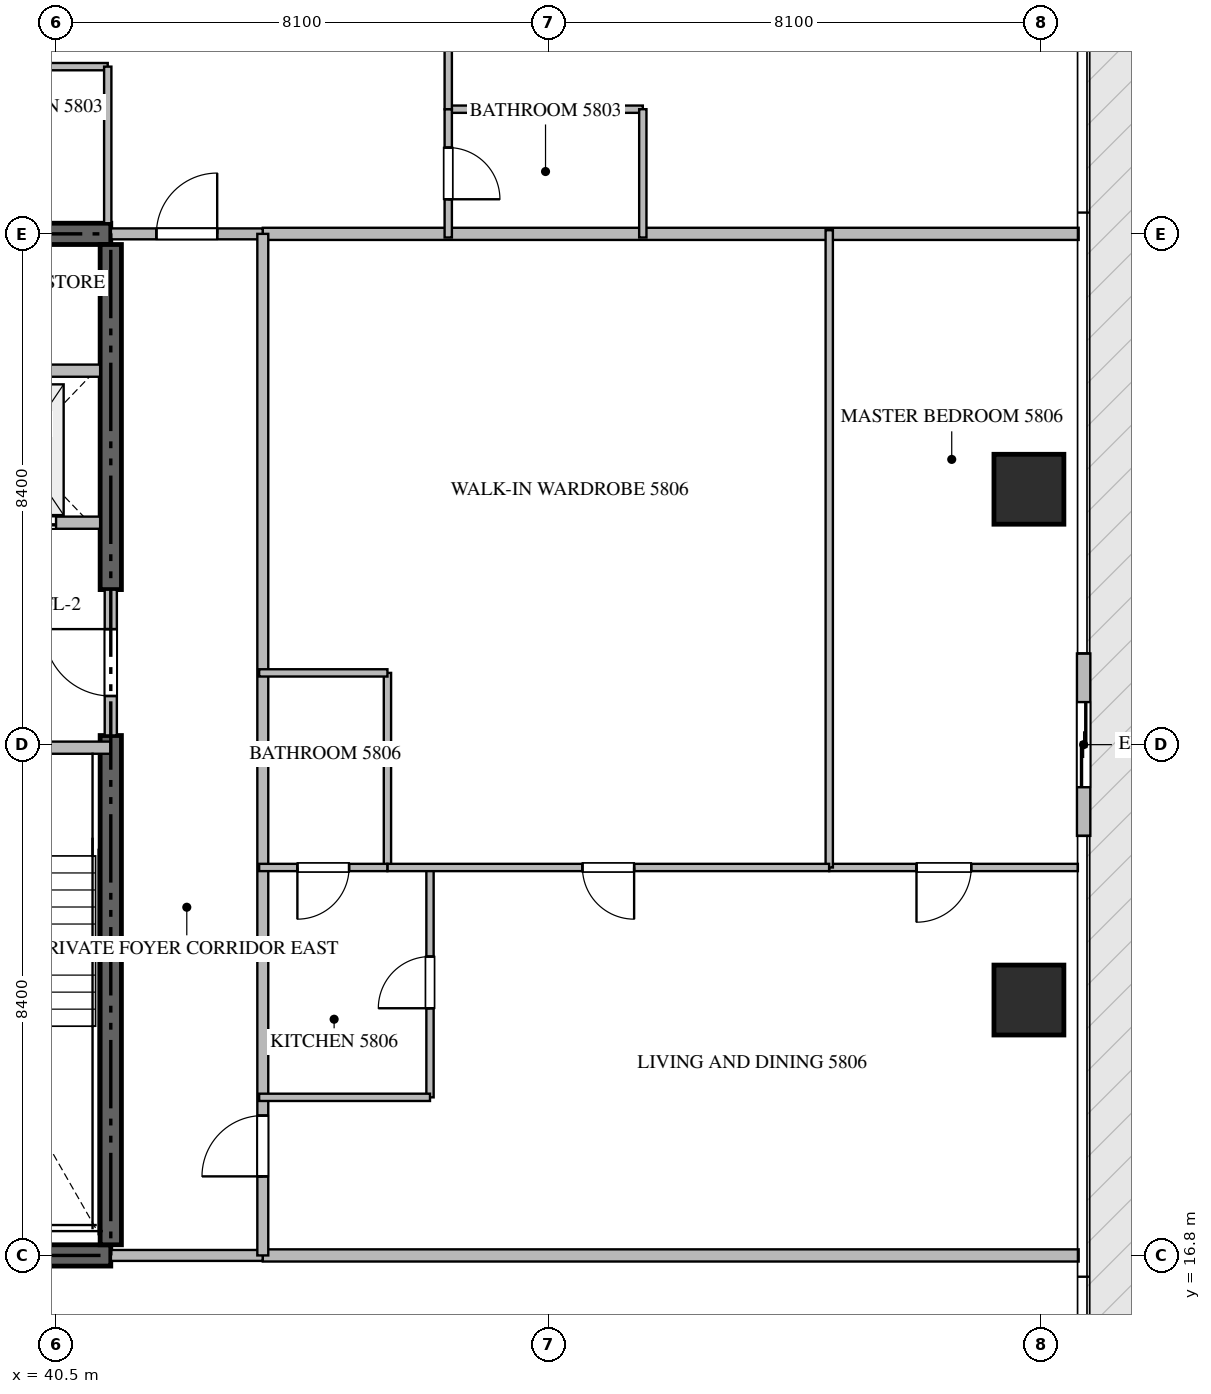
"""IFC4 building model, lengths in metres.
Left out: names, types, materials, properties, quantities, classifications, styles, units other than length and angle.
Written with IfcOpenShell. Run it as: python <this file> out.ifc"""

import sys

from ifc_helpers import new_model, si_unit, direction, frame, frame_2d, origin, origin_2d, place, context, subcontext, project, spatial, rectangle, extrude, source, transform, mapped, element, fill, save


model = new_model("IFC4")
c1 = context("Model", 3, precision=1e-05, world=origin(), true_north=direction((0.0, 1.0)))
c2 = subcontext(c1, "Body", "Model", "MODEL_VIEW")
j1 = project(units=[si_unit("LENGTHUNIT", "METRE"), si_unit("PLANEANGLEUNIT", "RADIAN")], contexts=[c1])
p1 = place(None, origin())
s1 = spatial("IfcSite", under=j1, at=p1, CompositionType="ELEMENT")
p2 = place(p1, origin())
s2 = spatial("IfcBuilding", under=s1, at=p2, CompositionType="ELEMENT")
p3 = place(p2, frame((0.0, 0.0, 233.55)))
s3 = spatial("IfcBuildingStorey", under=s2, at=p3, CompositionType="ELEMENT", Elevation=233.55)
for number, where, z_axis, x_axis in (
    (1, (23.4, 16.8, -0.26), (0.0, 0.0, 1.0), (1.0, 0.0, 0.0)),
    (2, (41.4, 33.6, -0.26), (0.0, 0.0, 1.0), (-1.0, 0.0, 0.0)),
):
    element("IfcWall", number, at=place(p3, frame(where, z_axis=z_axis, x_axis=x_axis)), inside=s3, PredefinedType="SHEAR", context=c2, shape_type="SweptSolid", body=[
        extrude(rectangle(XDim=18.0, YDim=0.35, at=frame_2d((9.0, 0.0))), origin(), (0.0, 0.0, 1.0), 3.848),
    ])
p4 = place(p3, frame((41.4, 16.975, -0.26), z_axis=(0.0, 0.0, 1.0), x_axis=(0.0, 1.0, 0.0)))
e3 = element("IfcWall", 3, at=p4, inside=s3, PredefinedType="SHEAR", context=c2, shape_type="SweptSolid", body=[
    extrude(rectangle(XDim=8.375, YDim=0.35, at=frame_2d((4.188, 0.0))), origin(), (0.0, 0.0, 1.0), 3.848),
])
p5 = place(p3, frame((41.4, 27.75, -0.26), z_axis=(0.0, 0.0, 1.0), x_axis=(0.0, 1.0, 0.0)))
e4 = element("IfcWall", 4, at=p5, inside=s3, PredefinedType="SHEAR", context=c2, shape_type="SweptSolid", body=[
    extrude(rectangle(XDim=5.675, YDim=0.35, at=frame_2d((2.837, 0.0))), origin(), (0.0, 0.0, 1.0), 3.848),
])
m1 = source(origin(), c2, "Body", "SweptSolid", [
    extrude(rectangle(XDim=1.15, YDim=1.15, at=origin_2d()), origin(), (0.0, 0.0, 1.0), 3.85),
])
for number, where, z_axis, x_axis in (
    (5, (56.5, 21.0, -0.26), (0.0, 0.0, 1.0), (1.0, 0.0, 0.0)),
    (6, (56.5, 29.4, -0.26), (0.0, 0.0, 1.0), (1.0, 0.0, 0.0)),
):
    element("IfcColumn", number, at=place(p3, frame(where, z_axis=z_axis, x_axis=x_axis)), inside=s3, PredefinedType="COLUMN", context=c2, shape_type="MappedRepresentation", body=[
        mapped(m1, transform((0.0, 0.0, 0.0), scale=1.0)),
    ])
p6 = place(p3, frame((57.4, 23.7, 0.0), z_axis=(0.0, 0.0, 1.0), x_axis=(0.0, 1.0, 0.0)))
e7 = element("IfcWall", 7, at=p6, inside=s3, PredefinedType="ELEMENTEDWALL", context=c2, shape_type="SweptSolid", body=[
    extrude(rectangle(XDim=3.0, YDim=0.22, at=frame_2d((1.5, 0.0))), origin(), (0.0, 0.0, 1.0), 3.575),
])
p7 = place(p6, frame((0.8, 0.0, 0.0)))
e8 = element("IfcOpeningElement", 8, at=p7, cuts=e7, PredefinedType="OPENING", context=c2, shape_type="SweptSolid", body=[
    extrude(rectangle(XDim=1.4, YDim=2.25, at=frame_2d((0.7, 1.125))), frame((0.0, 0.12, 0.0), z_axis=(0.0, -1.0, 0.0), x_axis=(1.0, 0.0, 0.0)), (0.0, 0.0, 1.0), 0.24),
])
p8 = place(p3, frame((36.95, 25.15, 0.0), z_axis=(0.0, 0.0, 1.0), x_axis=(1.0, 0.0, 0.0)))
e9 = element("IfcWall", 9, at=p8, inside=s3, PredefinedType="STANDARD", context=c2, shape_type="SweptSolid", body=[
    extrude(rectangle(XDim=4.45, YDim=0.2, at=frame_2d((2.225, 0.0))), origin(), (0.0, 0.0, 1.0), 3.59),
])
p9 = place(p8, frame((1.65, 0.0, 0.0)))
e10 = element("IfcOpeningElement", 10, at=p9, cuts=e9, PredefinedType="OPENING", context=c2, shape_type="SweptSolid", body=[
    extrude(rectangle(XDim=1.1, YDim=2.15, at=frame_2d((0.55, 1.075))), frame((0.0, 0.11, 0.0), z_axis=(0.0, -1.0, 0.0), x_axis=(1.0, 0.0, 0.0)), (0.0, 0.0, 1.0), 0.22),
])
p10 = place(p3, frame((38.75, 28.85, 0.0), z_axis=(0.0, 0.0, 1.0), x_axis=(1.0, 0.0, 0.0)))
e11 = element("IfcWall", 11, at=p10, inside=s3, PredefinedType="STANDARD", context=c2, shape_type="SweptSolid", body=[
    extrude(rectangle(XDim=2.475, YDim=0.2, at=frame_2d((1.238, 0.0))), origin(), (0.0, 0.0, 1.0), 3.59),
])
p11 = place(p10, frame((0.55, 0.0, 0.0)))
e12 = element("IfcOpeningElement", 12, at=p11, cuts=e11, PredefinedType="OPENING", context=c2, shape_type="SweptSolid", body=[
    extrude(rectangle(XDim=1.2, YDim=2.2, at=frame_2d((0.6, 1.1))), frame((0.0, 0.11, 0.0), z_axis=(0.0, -1.0, 0.0), x_axis=(1.0, 0.0, 0.0)), (0.0, 0.0, 1.0), 0.22),
])
p12 = place(p3, frame((38.75, 31.35, 0.0), z_axis=(0.0, 0.0, 1.0), x_axis=(1.0, 0.0, 0.0)))
e13 = element("IfcWall", 13, at=p12, inside=s3, PredefinedType="STANDARD", context=c2, shape_type="SweptSolid", body=[
    extrude(rectangle(XDim=2.475, YDim=0.2, at=frame_2d((1.238, 0.0))), origin(), (0.0, 0.0, 1.0), 3.59),
])
p13 = place(p3, frame((41.4, 25.352, 0.0), z_axis=(0.0, 0.0, 1.0), x_axis=(0.0, 1.0, 0.0)))
e14 = element("IfcWall", 14, at=p13, inside=s3, PredefinedType="STANDARD", context=c2, shape_type="SweptSolid", body=[
    extrude(rectangle(XDim=2.396, YDim=0.2, at=frame_2d((1.198, 0.0))), origin(), (0.0, 0.0, 1.0), 3.59),
])
p14 = place(p13, frame((0.648, 0.0, 0.0)))
e15 = element("IfcOpeningElement", 15, at=p14, cuts=e14, PredefinedType="OPENING", context=c2, shape_type="SweptSolid", body=[
    extrude(rectangle(XDim=1.1, YDim=2.15, at=frame_2d((0.55, 1.075))), frame((0.0, 0.11, 0.0), z_axis=(0.0, -1.0, 0.0), x_axis=(1.0, 0.0, 0.0)), (0.0, 0.0, 1.0), 0.22),
])
for number, where, z_axis, x_axis in (
    (16, (43.9, 16.8, 0.0), (0.0, 0.0, 1.0), (1.0, 0.0, 0.0)),
    (17, (43.9, 33.6, 0.0), (0.0, 0.0, 1.0), (1.0, 0.0, 0.0)),
):
    element("IfcWall", number, at=place(p3, frame(where, z_axis=z_axis, x_axis=x_axis)), inside=s3, PredefinedType="PARTITIONING", context=c2, shape_type="SweptSolid", body=[
        extrude(rectangle(XDim=13.418, YDim=0.2, at=frame_2d((6.709, 0.0))), origin(), (0.0, 0.0, 1.0), 3.59),
    ])
p15 = place(p3, frame((41.402, 16.8, 0.0), z_axis=(0.0, 0.0, 1.0), x_axis=(1.0, 0.0, 0.0)))
e18 = element("IfcWall", 18, at=p15, inside=s3, PredefinedType="PARTITIONING", context=c2, shape_type="SweptSolid", body=[
    extrude(rectangle(XDim=2.496, YDim=0.18, at=frame_2d((1.248, 0.0))), origin(), (0.0, 0.0, 1.0), 3.59),
])
p16 = place(p3, frame((41.402, 33.6, 0.0), z_axis=(0.0, 0.0, 1.0), x_axis=(1.0, 0.0, 0.0)))
e19 = element("IfcWall", 19, at=p16, inside=s3, PredefinedType="PARTITIONING", context=c2, shape_type="SweptSolid", body=[
    extrude(rectangle(XDim=2.496, YDim=0.18, at=frame_2d((1.248, 0.0))), origin(), (0.0, 0.0, 1.0), 3.59),
])
p17 = place(p16, frame((0.748, 0.0, 0.0)))
e20 = element("IfcOpeningElement", 20, at=p17, cuts=e19, PredefinedType="OPENING", context=c2, shape_type="SweptSolid", body=[
    extrude(rectangle(XDim=1.0, YDim=2.15, at=frame_2d((0.5, 1.075))), frame((0.0, 0.1, 0.0), z_axis=(0.0, -1.0, 0.0), x_axis=(1.0, 0.0, 0.0)), (0.0, 0.0, 1.0), 0.2),
])
p18 = place(p3, frame((43.9, 16.8, 0.0), z_axis=(0.0, 0.0, 1.0), x_axis=(0.0, 1.0, 0.0)))
e21 = element("IfcWall", 21, at=p18, inside=s3, PredefinedType="PARTITIONING", context=c2, shape_type="SweptSolid", body=[
    extrude(rectangle(XDim=16.8, YDim=0.18, at=frame_2d((8.4, 0.0))), origin(), (0.0, 0.0, 1.0), 3.59),
])
p19 = place(p18, frame((1.3, 0.0, 0.0)))
e22 = element("IfcOpeningElement", 22, at=p19, cuts=e21, PredefinedType="OPENING", context=c2, shape_type="SweptSolid", body=[
    extrude(rectangle(XDim=1.0, YDim=2.15, at=frame_2d((0.5, 1.075))), frame((0.0, 0.1, 0.0), z_axis=(0.0, -1.0, 0.0), x_axis=(1.0, 0.0, 0.0)), (0.0, 0.0, 1.0), 0.2),
])
p20 = place(p3, frame((38.5, 36.35, 0.0), z_axis=(0.0, 0.0, 1.0), x_axis=(1.0, 0.0, 0.0)))
e23 = element("IfcWall", 23, at=p20, inside=s3, PredefinedType="PARTITIONING", context=c2, shape_type="SweptSolid", body=[
    extrude(rectangle(XDim=2.85, YDim=0.12, at=frame_2d((1.425, 0.0))), origin(), (0.0, 0.0, 1.0), 3.59),
])
p21 = place(p20, frame((1.0, 0.0, 0.0)))
e24 = element("IfcOpeningElement", 24, at=p21, cuts=e23, PredefinedType="OPENING", context=c2, shape_type="SweptSolid", body=[
    extrude(rectangle(XDim=0.85, YDim=2.1, at=frame_2d((0.425, 1.05))), frame((0.0, 0.07, 0.0), z_axis=(0.0, -1.0, 0.0), x_axis=(1.0, 0.0, 0.0)), (0.0, 0.0, 1.0), 0.14),
])
p22 = place(p3, frame((41.35, 36.35, 0.0), z_axis=(0.0, 0.0, 1.0), x_axis=(0.0, -1.0, 0.0)))
e25 = element("IfcWall", 25, at=p22, inside=s3, PredefinedType="PARTITIONING", context=c2, shape_type="SweptSolid", body=[
    extrude(rectangle(XDim=2.575, YDim=0.12, at=frame_2d((1.288, 0.0))), origin(), (0.0, 0.0, 1.0), 3.59),
])
p23 = place(p3, frame((46.95, 35.65, 0.0), z_axis=(0.0, 0.0, 1.0), x_axis=(1.0, 0.0, 0.0)))
e26 = element("IfcWall", 26, at=p23, inside=s3, PredefinedType="PARTITIONING", context=c2, shape_type="SweptSolid", body=[
    extrude(rectangle(XDim=3.2, YDim=0.12, at=frame_2d((1.6, 0.0))), origin(), (0.0, 0.0, 1.0), 3.59),
])
p24 = place(p3, frame((50.15, 35.65, 0.0), z_axis=(0.0, 0.0, 1.0), x_axis=(0.0, -1.0, 0.0)))
e27 = element("IfcWall", 27, at=p24, inside=s3, PredefinedType="PARTITIONING", context=c2, shape_type="SweptSolid", body=[
    extrude(rectangle(XDim=2.11, YDim=0.12, at=frame_2d((1.055, 0.0))), origin(), (0.0, 0.0, 1.0), 3.59),
])
p25 = place(p3, frame((46.95, 41.73, 0.0), z_axis=(0.0, 0.0, 1.0), x_axis=(0.0, -1.0, 0.0)))
e28 = element("IfcWall", 28, at=p25, inside=s3, PredefinedType="PARTITIONING", context=c2, shape_type="SweptSolid", body=[
    extrude(rectangle(XDim=6.08, YDim=0.12, at=frame_2d((3.04, 0.0))), origin(), (0.0, 0.0, 1.0), 3.59),
])
p26 = place(p25, frame((2.615, 0.0, 0.0)))
e29 = element("IfcOpeningElement", 29, at=p26, cuts=e28, PredefinedType="OPENING", context=c2, shape_type="SweptSolid", body=[
    extrude(rectangle(XDim=0.85, YDim=2.1, at=frame_2d((0.425, 1.05))), frame((0.0, 0.07, 0.0), z_axis=(0.0, -1.0, 0.0), x_axis=(1.0, 0.0, 0.0)), (0.0, 0.0, 1.0), 0.14),
])
p27 = place(p3, frame((46.95, 35.648, 0.0), z_axis=(0.0, 0.0, 1.0), x_axis=(0.0, -1.0, 0.0)))
e30 = element("IfcWall", 30, at=p27, inside=s3, PredefinedType="PARTITIONING", context=c2, shape_type="SweptSolid", body=[
    extrude(rectangle(XDim=2.108, YDim=0.12, at=frame_2d((1.054, 0.0))), origin(), (0.0, 0.0, 1.0), 3.59),
])
p28 = place(p27, frame((0.629, 0.0, 0.0)))
e31 = element("IfcOpeningElement", 31, at=p28, cuts=e30, PredefinedType="OPENING", context=c2, shape_type="SweptSolid", body=[
    extrude(rectangle(XDim=0.85, YDim=2.1, at=frame_2d((0.425, 1.05))), frame((0.0, 0.07, 0.0), z_axis=(0.0, -1.0, 0.0), x_axis=(1.0, 0.0, 0.0)), (0.0, 0.0, 1.0), 0.14),
])
p29 = place(p3, frame((46.65, 19.4, 0.0), z_axis=(0.0, 0.0, 1.0), x_axis=(0.0, 1.0, 0.0)))
e32 = element("IfcWall", 32, at=p29, inside=s3, PredefinedType="PARTITIONING", context=c2, shape_type="SweptSolid", body=[
    extrude(rectangle(XDim=3.78, YDim=0.12, at=frame_2d((1.89, 0.0))), origin(), (0.0, 0.0, 1.0), 3.59),
])
p30 = place(p29, frame((1.465, 0.0, 0.0)))
e33 = element("IfcOpeningElement", 33, at=p30, cuts=e32, PredefinedType="OPENING", context=c2, shape_type="SweptSolid", body=[
    extrude(rectangle(XDim=0.85, YDim=2.1, at=frame_2d((0.425, 1.05))), frame((0.0, 0.07, 0.0), z_axis=(0.0, -1.0, 0.0), x_axis=(1.0, 0.0, 0.0)), (0.0, 0.0, 1.0), 0.14),
])
p31 = place(p3, frame((46.65, 19.4, 0.0), z_axis=(0.0, 0.0, 1.0), x_axis=(-1.0, 0.0, 0.0)))
e34 = element("IfcWall", 34, at=p31, inside=s3, PredefinedType="PARTITIONING", context=c2, shape_type="SweptSolid", body=[
    extrude(rectangle(XDim=2.81, YDim=0.12, at=frame_2d((1.405, 0.0))), origin(), (0.0, 0.0, 1.0), 3.59),
])
p32 = place(p3, frame((57.305, 23.18, 0.0), z_axis=(0.0, 0.0, 1.0), x_axis=(-1.0, 0.0, 0.0)))
e35 = element("IfcWall", 35, at=p32, inside=s3, PredefinedType="PARTITIONING", context=c2, shape_type="SweptSolid", body=[
    extrude(rectangle(XDim=4.089, YDim=0.12, at=frame_2d((2.044, 0.0))), origin(), (0.0, 0.0, 1.0), 3.59),
])
p33 = place(p32, frame((1.754, 0.0, 0.0)))
e36 = element("IfcOpeningElement", 36, at=p33, cuts=e35, PredefinedType="OPENING", context=c2, shape_type="SweptSolid", body=[
    extrude(rectangle(XDim=0.9, YDim=2.1, at=frame_2d((0.45, 1.05))), frame((0.0, 0.07, 0.0), z_axis=(0.0, -1.0, 0.0), x_axis=(1.0, 0.0, 0.0)), (0.0, 0.0, 1.0), 0.14),
])
p34 = place(p3, frame((53.216, 23.18, 0.0), z_axis=(0.0, 0.0, 1.0), x_axis=(0.0, 1.0, 0.0)))
e37 = element("IfcWall", 37, at=p34, inside=s3, PredefinedType="PARTITIONING", context=c2, shape_type="SweptSolid", body=[
    extrude(rectangle(XDim=10.48, YDim=0.12, at=frame_2d((5.24, 0.0))), origin(), (0.0, 0.0, 1.0), 3.59),
])
p35 = place(p3, frame((45.95, 23.18, 0.0), z_axis=(0.0, 0.0, 1.0), x_axis=(0.0, 1.0, 0.0)))
e38 = element("IfcWall", 38, at=p35, inside=s3, PredefinedType="PARTITIONING", context=c2, shape_type="SweptSolid", body=[
    extrude(rectangle(XDim=3.2, YDim=0.12, at=frame_2d((1.6, 0.0))), origin(), (0.0, 0.0, 1.0), 3.59),
])
p36 = place(p3, frame((45.95, 26.38, 0.0), z_axis=(0.0, 0.0, 1.0), x_axis=(-1.0, 0.0, 0.0)))
e39 = element("IfcWall", 39, at=p36, inside=s3, PredefinedType="PARTITIONING", context=c2, shape_type="SweptSolid", body=[
    extrude(rectangle(XDim=2.11, YDim=0.12, at=frame_2d((1.055, 0.0))), origin(), (0.0, 0.0, 1.0), 3.59),
])
p37 = place(p3, frame((53.214, 23.18, 0.0), z_axis=(0.0, 0.0, 1.0), x_axis=(-1.0, 0.0, 0.0)))
e40 = element("IfcWall", 40, at=p37, inside=s3, PredefinedType="PARTITIONING", context=c2, shape_type="SweptSolid", body=[
    extrude(rectangle(XDim=7.264, YDim=0.12, at=frame_2d((3.632, 0.0))), origin(), (0.0, 0.0, 1.0), 3.59),
])
p38 = place(p37, frame((3.207, 0.0, 0.0)))
e41 = element("IfcOpeningElement", 41, at=p38, cuts=e40, PredefinedType="OPENING", context=c2, shape_type="SweptSolid", body=[
    extrude(rectangle(XDim=0.85, YDim=2.1, at=frame_2d((0.425, 1.05))), frame((0.0, 0.07, 0.0), z_axis=(0.0, -1.0, 0.0), x_axis=(1.0, 0.0, 0.0)), (0.0, 0.0, 1.0), 0.14),
])
p39 = place(p3, frame((45.948, 23.18, 0.0), z_axis=(0.0, 0.0, 1.0), x_axis=(-1.0, 0.0, 0.0)))
e42 = element("IfcWall", 42, at=p39, inside=s3, PredefinedType="PARTITIONING", context=c2, shape_type="SweptSolid", body=[
    extrude(rectangle(XDim=2.108, YDim=0.12, at=frame_2d((1.054, 0.0))), origin(), (0.0, 0.0, 1.0), 3.59),
])
p40 = place(p39, frame((0.629, 0.0, 0.0)))
e43 = element("IfcOpeningElement", 43, at=p40, cuts=e42, PredefinedType="OPENING", context=c2, shape_type="SweptSolid", body=[
    extrude(rectangle(XDim=0.85, YDim=2.1, at=frame_2d((0.425, 1.05))), frame((0.0, 0.07, 0.0), z_axis=(0.0, -1.0, 0.0), x_axis=(1.0, 0.0, 0.0)), (0.0, 0.0, 1.0), 0.14),
])
m2 = source(origin(), c2, "Body", "SweptSolid", [
    extrude(rectangle(XDim=1.4, YDim=2.25, at=frame_2d((0.7, 1.125))), frame((0.0, 0.025, 0.0), z_axis=(0.0, -1.0, 0.0), x_axis=(1.0, 0.0, 0.0)), (0.0, 0.0, 1.0), 0.05),
])
p41 = place(p7, origin())
e44 = element("IfcDoor", 44, at=p41, inside=s3, OperationType="SLIDING_TO_LEFT", PredefinedType="DOOR", context=c2, shape_type="MappedRepresentation", body=[
    mapped(m2, transform((0.0, 0.0, 0.0), scale=1.0)),
])
fill(e8, e44)
m3 = source(origin(), c2, "Body", "SweptSolid", [
    extrude(rectangle(XDim=1.2, YDim=2.2, at=frame_2d((0.6, 1.1))), frame((0.0, 0.025, 0.0), z_axis=(0.0, -1.0, 0.0), x_axis=(1.0, 0.0, 0.0)), (0.0, 0.0, 1.0), 0.05),
])
p42 = place(p11, origin())
e45 = element("IfcDoor", 45, at=p42, inside=s3, OperationType="DOUBLE_DOOR_SLIDING", PredefinedType="DOOR", context=c2, shape_type="MappedRepresentation", body=[
    mapped(m3, transform((0.0, 0.0, 0.0), scale=1.0)),
])
fill(e12, e45)
m4 = source(origin(), c2, "Body", "SweptSolid", [
    extrude(rectangle(XDim=1.1, YDim=2.15, at=frame_2d((0.55, 1.075))), frame((0.0, 0.025, 0.0), z_axis=(0.0, -1.0, 0.0), x_axis=(1.0, 0.0, 0.0)), (0.0, 0.0, 1.0), 0.05),
])
p43 = place(p14, origin())
e46 = element("IfcDoor", 46, at=p43, inside=s3, OperationType="SINGLE_SWING_RIGHT", PredefinedType="DOOR", context=c2, shape_type="MappedRepresentation", body=[
    mapped(m4, transform((0.0, 0.0, 0.0), scale=1.0)),
])
fill(e15, e46)
m5 = source(origin(), c2, "Body", "SweptSolid", [
    extrude(rectangle(XDim=1.0, YDim=2.15, at=frame_2d((0.5, 1.075))), frame((0.0, 0.025, 0.0), z_axis=(0.0, -1.0, 0.0), x_axis=(1.0, 0.0, 0.0)), (0.0, 0.0, 1.0), 0.05),
])
p44 = place(p17, origin())
e47 = element("IfcDoor", 47, at=p44, inside=s3, OperationType="SINGLE_SWING_RIGHT", PredefinedType="DOOR", context=c2, shape_type="MappedRepresentation", body=[
    mapped(m5, transform((0.0, 0.0, 0.0), scale=1.0)),
])
fill(e20, e47)
p45 = place(p19, origin())
e48 = element("IfcDoor", 48, at=p45, inside=s3, OperationType="SINGLE_SWING_LEFT", PredefinedType="DOOR", context=c2, shape_type="MappedRepresentation", body=[
    mapped(m5, transform((0.0, 0.0, 0.0), scale=1.0)),
])
fill(e22, e48)
m6 = source(origin(), c2, "Body", "SweptSolid", [
    extrude(rectangle(XDim=0.85, YDim=2.1, at=frame_2d((0.425, 1.05))), frame((0.0, 0.025, 0.0), z_axis=(0.0, -1.0, 0.0), x_axis=(1.0, 0.0, 0.0)), (0.0, 0.0, 1.0), 0.05),
])
p46 = place(p28, origin())
e49 = element("IfcDoor", 49, at=p46, inside=s3, OperationType="SINGLE_SWING_RIGHT", PredefinedType="DOOR", context=c2, shape_type="MappedRepresentation", body=[
    mapped(m6, transform((0.0, 0.0, 0.0), scale=1.0)),
])
fill(e31, e49)
p47 = place(p30, origin())
e50 = element("IfcDoor", 50, at=p47, inside=s3, OperationType="SINGLE_SWING_LEFT", PredefinedType="DOOR", context=c2, shape_type="MappedRepresentation", body=[
    mapped(m6, transform((0.0, 0.0, 0.0), scale=1.0)),
])
fill(e33, e50)
m7 = source(origin(), c2, "Body", "SweptSolid", [
    extrude(rectangle(XDim=0.9, YDim=2.1, at=frame_2d((0.45, 1.05))), frame((0.0, 0.025, 0.0), z_axis=(0.0, -1.0, 0.0), x_axis=(1.0, 0.0, 0.0)), (0.0, 0.0, 1.0), 0.05),
])
p48 = place(p33, origin())
e51 = element("IfcDoor", 51, at=p48, inside=s3, OperationType="SINGLE_SWING_RIGHT", PredefinedType="DOOR", context=c2, shape_type="MappedRepresentation", body=[
    mapped(m7, transform((0.0, 0.0, 0.0), scale=1.0)),
])
fill(e36, e51)
p49 = place(p38, origin())
e52 = element("IfcDoor", 52, at=p49, inside=s3, OperationType="SINGLE_SWING_LEFT", PredefinedType="DOOR", context=c2, shape_type="MappedRepresentation", body=[
    mapped(m6, transform((0.0, 0.0, 0.0), scale=1.0)),
])
fill(e41, e52)
p50 = place(p40, origin())
e53 = element("IfcDoor", 53, at=p50, inside=s3, OperationType="SINGLE_SWING_RIGHT", PredefinedType="DOOR", context=c2, shape_type="MappedRepresentation", body=[
    mapped(m6, transform((0.0, 0.0, 0.0), scale=1.0)),
])
fill(e43, e53)
save(model, sys.argv[1])
